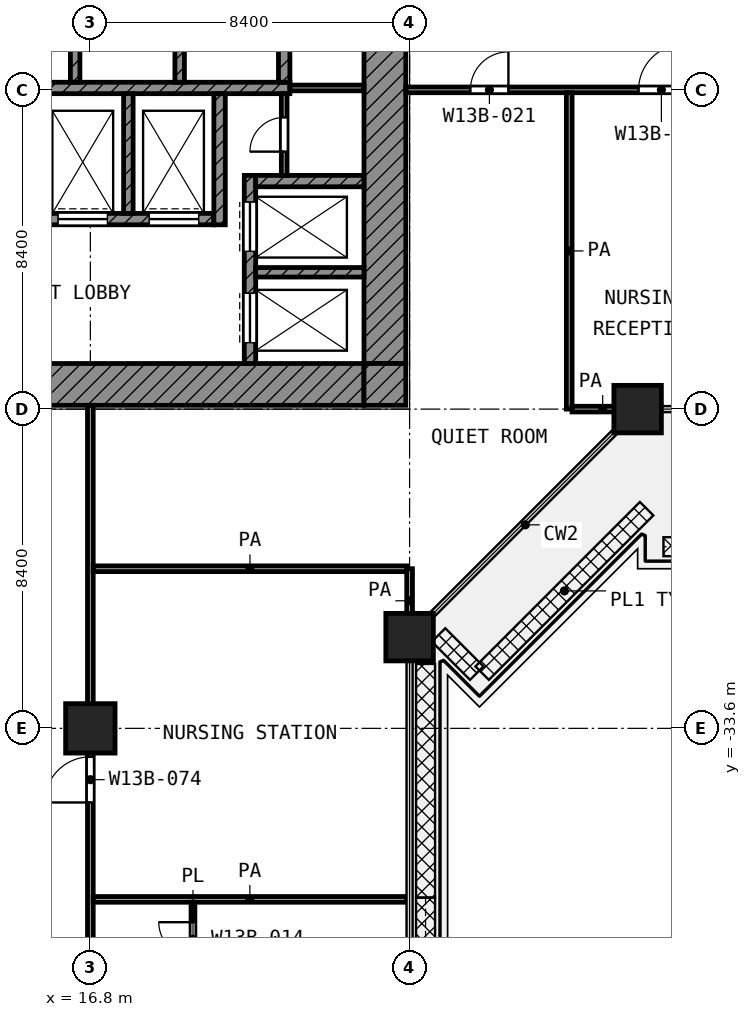
"""IFC4 building model, lengths in metres.
Left out: names, types, materials, properties, quantities, classifications, styles, units other than length and angle.
Written with IfcOpenShell. Run it as: python <this file> out.ifc"""

import sys

from ifc_helpers import new_model, si_unit, direction, frame, frame_2d, origin, origin_2d, place, context, subcontext, project, spatial, rectangle, extrude, element, fill, save


model = new_model("IFC4")
c1 = context("Model", 3, precision=1e-05, world=origin(), true_north=direction((0.0, 1.0)))
c2 = subcontext(c1, "Body", "Model", "MODEL_VIEW")
j1 = project(units=[si_unit("LENGTHUNIT", "METRE"), si_unit("PLANEANGLEUNIT", "RADIAN")], contexts=[c1])
p1 = place(None, origin())
s1 = spatial("IfcSite", under=j1, at=p1, CompositionType="ELEMENT")
p2 = place(p1, origin())
s2 = spatial("IfcBuilding", under=s1, at=p2, CompositionType="ELEMENT")
p3 = place(p2, frame((0.0, 0.0, 89.6)))
s3 = spatial("IfcBuildingStorey", under=s2, at=p3, CompositionType="ELEMENT", Elevation=89.6)
for number, where, z_axis, x_axis in (
    (1, (31.2, -25.2, 0.0), (0.0, 0.0, 1.0), (1.0, 0.0, 0.0)),
    (2, (25.2, -31.2, 0.0), (0.0, 0.0, 1.0), (1.0, 0.0, 0.0)),
):
    element("IfcColumn", number, at=place(p3, frame(where, z_axis=z_axis, x_axis=x_axis)), inside=s3, PredefinedType="COLUMN", context=c2, shape_type="SweptSolid", body=[
        extrude(rectangle(XDim=1.25, YDim=1.25, at=origin_2d()), origin(), (0.0, 0.0, 1.0), 4.2),
    ])
p4 = place(p3, frame((16.8, -33.6, 0.0), z_axis=(0.0, 0.0, 1.0), x_axis=(1.0, 0.0, 0.0)))
e3 = element("IfcColumn", 3, at=p4, inside=s3, PredefinedType="COLUMN", context=c2, shape_type="SweptSolid", body=[
    extrude(rectangle(XDim=1.3, YDim=1.3, at=origin_2d()), origin(), (0.0, 0.0, 1.0), 4.2),
])
p5 = place(p3, frame((24.55, -24.0, 0.0), z_axis=(0.0, 0.0, 1.0), x_axis=(0.0, 1.0, 0.0)))
e4 = element("IfcWall", 4, at=p5, inside=s3, PredefinedType="SHEAR", context=c2, shape_type="SweptSolid", body=[
    extrude(rectangle(XDim=18.6, YDim=1.1, at=frame_2d((9.3, 0.0))), origin(), (0.0, 0.0, 1.0), 3.7),
])
p6 = place(p5, frame((10.5, 0.0, 0.0)))
e5 = element("IfcOpeningElement", 5, at=p6, cuts=e4, PredefinedType="OPENING", context=c2, shape_type="SweptSolid", body=[
    extrude(rectangle(XDim=1.8, YDim=2.1, at=frame_2d((0.9, 1.05))), frame((0.0, 0.56, 0.0), z_axis=(0.0, -1.0, 0.0), x_axis=(1.0, 0.0, 0.0)), (0.0, 0.0, 1.0), 1.12),
])
p7 = place(p3, frame((5.4, -24.55, 0.0), z_axis=(0.0, 0.0, 1.0), x_axis=(1.0, 0.0, 0.0)))
e6 = element("IfcWall", 6, at=p7, inside=s3, PredefinedType="SHEAR", context=c2, shape_type="SweptSolid", body=[
    extrude(rectangle(XDim=18.6, YDim=1.1, at=frame_2d((9.3, 0.0))), origin(), (0.0, 0.0, 1.0), 3.7),
])
p8 = place(p7, frame((6.3, 0.0, 0.0)))
e7 = element("IfcOpeningElement", 7, at=p8, cuts=e6, PredefinedType="OPENING", context=c2, shape_type="SweptSolid", body=[
    extrude(rectangle(XDim=1.8, YDim=2.1, at=frame_2d((0.9, 1.05))), frame((0.0, 0.56, 0.0), z_axis=(0.0, -1.0, 0.0), x_axis=(1.0, 0.0, 0.0)), (0.0, 0.0, 1.0), 1.12),
])
p9 = place(p3, frame((24.55, -25.1, 0.0), z_axis=(0.0, 0.0, 1.0), x_axis=(0.0, 1.0, 0.0)))
e8 = element("IfcWall", 8, at=p9, inside=s3, PredefinedType="SHEAR", context=c2, shape_type="SweptSolid", body=[
    extrude(rectangle(XDim=1.1, YDim=1.1, at=frame_2d((0.55, 0.0))), origin(), (0.0, 0.0, 1.0), 3.7),
])
p10 = place(p3, frame((5.4, -16.75, 0.0), z_axis=(0.0, 0.0, 1.0), x_axis=(1.0, 0.0, 0.0)))
e9 = element("IfcWall", 9, at=p10, inside=s3, PredefinedType="SHEAR", context=c2, shape_type="SweptSolid", body=[
    extrude(rectangle(XDim=16.65, YDim=0.3, at=frame_2d((8.325, 0.0))), origin(), (0.0, 0.0, 1.0), 3.7),
])
p11 = place(p3, frame((5.4, -20.2, 0.0), z_axis=(0.0, 0.0, 1.0), x_axis=(1.0, 0.0, 0.0)))
e10 = element("IfcWall", 10, at=p11, inside=s3, PredefinedType="SHEAR", context=c2, shape_type="SweptSolid", body=[
    extrude(rectangle(XDim=14.65, YDim=0.3, at=frame_2d((7.325, 0.0))), origin(), (0.0, 0.0, 1.0), 3.7),
])
p12 = place(p11, frame((10.55, 0.0, 0.0)))
e11 = element("IfcOpeningElement", 11, at=p12, cuts=e10, PredefinedType="OPENING", context=c2, shape_type="SweptSolid", body=[
    extrude(rectangle(XDim=1.3, YDim=2.1, at=frame_2d((0.65, 1.05))), frame((0.0, 0.16, 0.0), z_axis=(0.0, -1.0, 0.0), x_axis=(1.0, 0.0, 0.0)), (0.0, 0.0, 1.0), 0.32),
])
p13 = place(p11, frame((12.95, 0.0, 0.0)))
e12 = element("IfcOpeningElement", 12, at=p13, cuts=e10, PredefinedType="OPENING", context=c2, shape_type="SweptSolid", body=[
    extrude(rectangle(XDim=1.3, YDim=2.1, at=frame_2d((0.65, 1.05))), frame((0.0, 0.16, 0.0), z_axis=(0.0, -1.0, 0.0), x_axis=(1.0, 0.0, 0.0)), (0.0, 0.0, 1.0), 0.32),
])
p14 = place(p11, frame((0.55, 0.0, 0.0)))
e13 = element("IfcOpeningElement", 13, at=p14, cuts=e10, PredefinedType="OPENING", context=c2, shape_type="SweptSolid", body=[
    extrude(rectangle(XDim=1.3, YDim=2.1, at=frame_2d((0.65, 1.05))), frame((0.0, 0.16, 0.0), z_axis=(0.0, -1.0, 0.0), x_axis=(1.0, 0.0, 0.0)), (0.0, 0.0, 1.0), 0.32),
])
p15 = place(p11, frame((2.95, 0.0, 0.0)))
e14 = element("IfcOpeningElement", 14, at=p15, cuts=e10, PredefinedType="OPENING", context=c2, shape_type="SweptSolid", body=[
    extrude(rectangle(XDim=1.3, YDim=2.1, at=frame_2d((0.65, 1.05))), frame((0.0, 0.16, 0.0), z_axis=(0.0, -1.0, 0.0), x_axis=(1.0, 0.0, 0.0)), (0.0, 0.0, 1.0), 0.32),
])
p16 = place(p11, frame((5.95, 0.0, 0.0)))
e15 = element("IfcOpeningElement", 15, at=p16, cuts=e10, PredefinedType="OPENING", context=c2, shape_type="SweptSolid", body=[
    extrude(rectangle(XDim=0.9, YDim=2.1, at=frame_2d((0.45, 1.05))), frame((0.0, 0.16, 0.0), z_axis=(0.0, -1.0, 0.0), x_axis=(1.0, 0.0, 0.0)), (0.0, 0.0, 1.0), 0.32),
])
p17 = place(p11, frame((8.35, 0.0, 0.0)))
e16 = element("IfcOpeningElement", 16, at=p17, cuts=e10, PredefinedType="OPENING", context=c2, shape_type="SweptSolid", body=[
    extrude(rectangle(XDim=0.9, YDim=2.1, at=frame_2d((0.45, 1.05))), frame((0.0, 0.16, 0.0), z_axis=(0.0, -1.0, 0.0), x_axis=(1.0, 0.0, 0.0)), (0.0, 0.0, 1.0), 0.32),
])
p18 = place(p3, frame((20.2, -20.35, 0.0), z_axis=(0.0, 0.0, 1.0), x_axis=(0.0, 1.0, 0.0)))
e17 = element("IfcWall", 17, at=p18, inside=s3, PredefinedType="SHEAR", context=c2, shape_type="SweptSolid", body=[
    extrude(rectangle(XDim=3.45, YDim=0.3, at=frame_2d((1.725, 0.0))), origin(), (0.0, 0.0, 1.0), 3.7),
])
p19 = place(p3, frame((21.9, -16.6, 0.0), z_axis=(0.0, 0.0, 1.0), x_axis=(0.0, 1.0, 0.0)))
e18 = element("IfcWall", 18, at=p19, inside=s3, PredefinedType="SHEAR", context=c2, shape_type="SweptSolid", body=[
    extrude(rectangle(XDim=2.35, YDim=0.3, at=frame_2d((1.175, 0.0))), origin(), (0.0, 0.0, 1.0), 3.7),
])
p20 = place(p3, frame((21.15, -19.2, 0.0), z_axis=(0.0, 0.0, 1.0), x_axis=(1.0, 0.0, 0.0)))
e19 = element("IfcWall", 19, at=p20, inside=s3, PredefinedType="SHEAR", context=c2, shape_type="SweptSolid", body=[
    extrude(rectangle(XDim=2.85, YDim=0.3, at=frame_2d((1.425, 0.0))), origin(), (0.0, 0.0, 1.0), 3.7),
])
p21 = place(p3, frame((21.0, -24.0, 0.0), z_axis=(0.0, 0.0, 1.0), x_axis=(0.0, 1.0, 0.0)))
e20 = element("IfcWall", 20, at=p21, inside=s3, PredefinedType="SHEAR", context=c2, shape_type="SweptSolid", body=[
    extrude(rectangle(XDim=4.95, YDim=0.3, at=frame_2d((2.475, 0.0))), origin(), (0.0, 0.0, 1.0), 3.7),
])
p22 = place(p21, frame((2.95, 0.0, 0.0)))
e21 = element("IfcOpeningElement", 21, at=p22, cuts=e20, PredefinedType="OPENING", context=c2, shape_type="SweptSolid", body=[
    extrude(rectangle(XDim=1.3, YDim=2.1, at=frame_2d((0.65, 1.05))), frame((0.0, 0.16, 0.0), z_axis=(0.0, -1.0, 0.0), x_axis=(1.0, 0.0, 0.0)), (0.0, 0.0, 1.0), 0.32),
])
p23 = place(p21, frame((0.55, 0.0, 0.0)))
e22 = element("IfcOpeningElement", 22, at=p23, cuts=e20, PredefinedType="OPENING", context=c2, shape_type="SweptSolid", body=[
    extrude(rectangle(XDim=1.3, YDim=2.1, at=frame_2d((0.65, 1.05))), frame((0.0, 0.16, 0.0), z_axis=(0.0, -1.0, 0.0), x_axis=(1.0, 0.0, 0.0)), (0.0, 0.0, 1.0), 0.32),
])
p24 = place(p3, frame((21.15, -21.6, 0.0), z_axis=(0.0, 0.0, 1.0), x_axis=(1.0, 0.0, 0.0)))
e23 = element("IfcWall", 23, at=p24, inside=s3, PredefinedType="SHEAR", context=c2, shape_type="SweptSolid", body=[
    extrude(rectangle(XDim=2.85, YDim=0.25, at=frame_2d((1.425, 0.0))), origin(), (0.0, 0.0, 1.0), 3.7),
])
p25 = place(p3, frame((17.8, -20.05, 0.0), z_axis=(0.0, 0.0, 1.0), x_axis=(0.0, 1.0, 0.0)))
e24 = element("IfcWall", 24, at=p25, inside=s3, PredefinedType="SHEAR", context=c2, shape_type="SweptSolid", body=[
    extrude(rectangle(XDim=3.15, YDim=0.25, at=frame_2d((1.575, 0.0))), origin(), (0.0, 0.0, 1.0), 3.7),
])
for number, where, z_axis, x_axis in (
    (25, (16.4, -16.6, 0.0), (0.0, 0.0, 1.0), (0.0, 1.0, 0.0)),
    (26, (19.15, -16.6, 0.0), (0.0, 0.0, 1.0), (0.0, 1.0, 0.0)),
):
    element("IfcWall", number, at=place(p3, frame(where, z_axis=z_axis, x_axis=x_axis)), inside=s3, PredefinedType="SHEAR", context=c2, shape_type="SweptSolid", body=[
        extrude(rectangle(XDim=2.35, YDim=0.25, at=frame_2d((1.175, 0.0))), origin(), (0.0, 0.0, 1.0), 3.7),
    ])
p26 = place(p3, frame((21.9, -19.05, 0.0), z_axis=(0.0, 0.0, 1.0), x_axis=(0.0, 1.0, 0.0)))
e27 = element("IfcWall", 27, at=p26, inside=s3, PredefinedType="PARTITIONING", context=c2, shape_type="SweptSolid", body=[
    extrude(rectangle(XDim=2.15, YDim=0.15, at=frame_2d((1.075, 0.0))), origin(), (0.0, 0.0, 1.0), 3.7),
])
p27 = place(p26, frame((0.625, 0.0, 0.0)))
e28 = element("IfcOpeningElement", 28, at=p27, cuts=e27, PredefinedType="OPENING", context=c2, shape_type="SweptSolid", body=[
    extrude(rectangle(XDim=0.9, YDim=2.1, at=frame_2d((0.45, 1.05))), frame((0.0, 0.085, 0.0), z_axis=(0.0, -1.0, 0.0), x_axis=(1.0, 0.0, 0.0)), (0.0, 0.0, 1.0), 0.17),
])
p28 = place(p3, frame((22.05, -16.75, 0.0), z_axis=(0.0, 0.0, 1.0), x_axis=(1.0, 0.0, 0.0)))
e29 = element("IfcWall", 29, at=p28, inside=s3, PredefinedType="PARTITIONING", context=c2, shape_type="SweptSolid", body=[
    extrude(rectangle(XDim=1.95, YDim=0.15, at=frame_2d((0.975, 0.0))), origin(), (0.0, 0.0, 1.0), 3.7),
])
p29 = place(p3, frame((19.5, -40.2, 0.0), z_axis=(0.0, 0.0, 1.0), x_axis=(0.0, 1.0, 0.0)))
e30 = element("IfcWall", 30, at=p29, inside=s3, PredefinedType="PARTITIONING", context=c2, shape_type="SweptSolid", body=[
    extrude(rectangle(XDim=2.025, YDim=0.1, at=frame_2d((1.012, 0.0))), origin(), (0.0, 0.0, 1.0), 3.7),
])
p30 = place(p29, frame((0.6, 0.0, 0.0)))
e31 = element("IfcOpeningElement", 31, at=p30, cuts=e30, PredefinedType="OPENING", context=c2, shape_type="SweptSolid", body=[
    extrude(rectangle(XDim=0.9, YDim=2.1, at=frame_2d((0.45, 1.05))), frame((0.0, 0.06, 0.0), z_axis=(0.0, -1.0, 0.0), x_axis=(1.0, 0.0, 0.0)), (0.0, 0.0, 1.0), 0.12),
])
p31 = place(p3, frame((16.875, -38.1, 0.0), z_axis=(0.0, 0.0, 1.0), x_axis=(1.0, 0.0, 0.0)))
e32 = element("IfcWall", 32, at=p31, inside=s3, PredefinedType="PARTITIONING", context=c2, shape_type="SweptSolid", body=[
    extrude(rectangle(XDim=8.245, YDim=0.15, at=frame_2d((4.123, 0.0))), origin(), (0.0, 0.0, 1.0), 3.7),
])
p32 = place(p3, frame((16.875, -29.4, 0.0), z_axis=(0.0, 0.0, 1.0), x_axis=(1.0, 0.0, 0.0)))
e33 = element("IfcWall", 33, at=p32, inside=s3, PredefinedType="PARTITIONING", context=c2, shape_type="SweptSolid", body=[
    extrude(rectangle(XDim=8.25, YDim=0.15, at=frame_2d((4.125, 0.0))), origin(), (0.0, 0.0, 1.0), 3.7),
])
p33 = place(p3, frame((29.475, -25.2, 0.0), z_axis=(0.0, 0.0, 1.0), x_axis=(1.0, 0.0, 0.0)))
e34 = element("IfcWall", 34, at=p33, inside=s3, PredefinedType="PARTITIONING", context=c2, shape_type="SweptSolid", body=[
    extrude(rectangle(XDim=1.612, YDim=0.15, at=frame_2d((0.806, 0.0))), origin(), (0.0, 0.0, 1.0), 3.7),
])
p34 = place(p3, frame((25.1, -16.8, 0.0), z_axis=(0.0, 0.0, 1.0), x_axis=(1.0, 0.0, 0.0)))
e35 = element("IfcWall", 35, at=p34, inside=s3, PredefinedType="PARTITIONING", context=c2, shape_type="SweptSolid", body=[
    extrude(rectangle(XDim=16.823, YDim=0.15, at=frame_2d((8.412, 0.0))), origin(), (0.0, 0.0, 1.0), 3.7),
])
p35 = place(p34, frame((1.7, 0.0, 0.0)))
e36 = element("IfcOpeningElement", 36, at=p35, cuts=e35, PredefinedType="OPENING", context=c2, shape_type="SweptSolid", body=[
    extrude(rectangle(XDim=1.0, YDim=2.1, at=frame_2d((0.5, 1.05))), frame((0.0, 0.085, 0.0), z_axis=(0.0, -1.0, 0.0), x_axis=(1.0, 0.0, 0.0)), (0.0, 0.0, 1.0), 0.17),
])
p36 = place(p34, frame((6.125, 0.0, 0.0)))
e37 = element("IfcOpeningElement", 37, at=p36, cuts=e35, PredefinedType="OPENING", context=c2, shape_type="SweptSolid", body=[
    extrude(rectangle(XDim=1.2, YDim=2.1, at=frame_2d((0.6, 1.05))), frame((0.0, 0.085, 0.0), z_axis=(0.0, -1.0, 0.0), x_axis=(1.0, 0.0, 0.0)), (0.0, 0.0, 1.0), 0.17),
])
p37 = place(p34, frame((13.15, 0.0, 0.0)))
e38 = element("IfcOpeningElement", 38, at=p37, cuts=e35, PredefinedType="OPENING", context=c2, shape_type="SweptSolid", body=[
    extrude(rectangle(XDim=1.2, YDim=2.1, at=frame_2d((0.6, 1.05))), frame((0.0, 0.085, 0.0), z_axis=(0.0, -1.0, 0.0), x_axis=(1.0, 0.0, 0.0)), (0.0, 0.0, 1.0), 0.17),
])
p38 = place(p34, frame((11.6, 0.0, 0.0)))
e39 = element("IfcOpeningElement", 39, at=p38, cuts=e35, PredefinedType="OPENING", context=c2, shape_type="SweptSolid", body=[
    extrude(rectangle(XDim=1.2, YDim=2.1, at=frame_2d((0.6, 1.05))), frame((0.0, 0.085, 0.0), z_axis=(0.0, -1.0, 0.0), x_axis=(1.0, 0.0, 0.0)), (0.0, 0.0, 1.0), 0.17),
])
p39 = place(p34, frame((15.0, 0.0, 0.0)))
e40 = element("IfcOpeningElement", 40, at=p39, cuts=e35, PredefinedType="OPENING", context=c2, shape_type="SweptSolid", body=[
    extrude(rectangle(XDim=1.2, YDim=2.1, at=frame_2d((0.6, 1.05))), frame((0.0, 0.085, 0.0), z_axis=(0.0, -1.0, 0.0), x_axis=(1.0, 0.0, 0.0)), (0.0, 0.0, 1.0), 0.17),
])
p40 = place(p3, frame((16.8, -58.798, 0.0), z_axis=(0.0, 0.0, 1.0), x_axis=(0.0, 1.0, 0.0)))
e41 = element("IfcWall", 41, at=p40, inside=s3, PredefinedType="PARTITIONING", context=c2, shape_type="SweptSolid", body=[
    extrude(rectangle(XDim=33.698, YDim=0.15, at=frame_2d((16.849, 0.0))), origin(), (0.0, 0.0, 1.0), 3.7),
])
p41 = place(p40, frame((23.248, 0.0, 0.0)))
e42 = element("IfcOpeningElement", 42, at=p41, cuts=e41, PredefinedType="OPENING", context=c2, shape_type="SweptSolid", body=[
    extrude(rectangle(XDim=1.2, YDim=2.1, at=frame_2d((0.6, 1.05))), frame((0.0, 0.085, 0.0), z_axis=(0.0, -1.0, 0.0), x_axis=(1.0, 0.0, 0.0)), (0.0, 0.0, 1.0), 0.17),
])
p42 = place(p40, frame((17.498, 0.0, 0.0)))
e43 = element("IfcOpeningElement", 43, at=p42, cuts=e41, PredefinedType="OPENING", context=c2, shape_type="SweptSolid", body=[
    extrude(rectangle(XDim=0.9, YDim=2.1, at=frame_2d((0.45, 1.05))), frame((0.0, 0.085, 0.0), z_axis=(0.0, -1.0, 0.0), x_axis=(1.0, 0.0, 0.0)), (0.0, 0.0, 1.0), 0.17),
])
p43 = place(p40, frame((13.648, 0.0, 0.0)))
e44 = element("IfcOpeningElement", 44, at=p43, cuts=e41, PredefinedType="OPENING", context=c2, shape_type="SweptSolid", body=[
    extrude(rectangle(XDim=1.2, YDim=2.1, at=frame_2d((0.6, 1.05))), frame((0.0, 0.085, 0.0), z_axis=(0.0, -1.0, 0.0), x_axis=(1.0, 0.0, 0.0)), (0.0, 0.0, 1.0), 0.17),
])
p44 = place(p40, frame((9.298, 0.0, 0.0)))
e45 = element("IfcOpeningElement", 45, at=p44, cuts=e41, PredefinedType="OPENING", context=c2, shape_type="SweptSolid", body=[
    extrude(rectangle(XDim=1.2, YDim=2.1, at=frame_2d((0.6, 1.05))), frame((0.0, 0.085, 0.0), z_axis=(0.0, -1.0, 0.0), x_axis=(1.0, 0.0, 0.0)), (0.0, 0.0, 1.0), 0.17),
])
p45 = place(p40, frame((6.498, 0.0, 0.0)))
e46 = element("IfcOpeningElement", 46, at=p45, cuts=e41, PredefinedType="OPENING", context=c2, shape_type="SweptSolid", body=[
    extrude(rectangle(XDim=1.2, YDim=2.1, at=frame_2d((0.6, 1.05))), frame((0.0, 0.085, 0.0), z_axis=(0.0, -1.0, 0.0), x_axis=(1.0, 0.0, 0.0)), (0.0, 0.0, 1.0), 0.17),
])
p46 = place(p40, frame((4.648, 0.0, 0.0)))
e47 = element("IfcOpeningElement", 47, at=p46, cuts=e41, PredefinedType="OPENING", context=c2, shape_type="SweptSolid", body=[
    extrude(rectangle(XDim=1.2, YDim=2.1, at=frame_2d((0.6, 1.05))), frame((0.0, 0.085, 0.0), z_axis=(0.0, -1.0, 0.0), x_axis=(1.0, 0.0, 0.0)), (0.0, 0.0, 1.0), 0.17),
])
p47 = place(p40, frame((0.698, 0.0, 0.0)))
e48 = element("IfcOpeningElement", 48, at=p47, cuts=e41, PredefinedType="OPENING", context=c2, shape_type="SweptSolid", body=[
    extrude(rectangle(XDim=1.2, YDim=2.1, at=frame_2d((0.6, 1.05))), frame((0.0, 0.085, 0.0), z_axis=(0.0, -1.0, 0.0), x_axis=(1.0, 0.0, 0.0)), (0.0, 0.0, 1.0), 0.17),
])
p48 = place(p3, frame((25.2, -31.087, 0.0), z_axis=(0.0, 0.0, 1.0), x_axis=(0.0, 1.0, 0.0)))
e49 = element("IfcWall", 49, at=p48, inside=s3, PredefinedType="PARTITIONING", context=c2, shape_type="SweptSolid", body=[
    extrude(rectangle(XDim=1.687, YDim=0.15, at=frame_2d((0.844, 0.0))), origin(), (0.0, 0.0, 1.0), 3.7),
])
p49 = place(p3, frame((29.4, -25.2, 0.0), z_axis=(0.0, 0.0, 1.0), x_axis=(0.0, 1.0, 0.0)))
e50 = element("IfcWall", 50, at=p49, inside=s3, PredefinedType="PARTITIONING", context=c2, shape_type="SweptSolid", body=[
    extrude(rectangle(XDim=8.325, YDim=0.15, at=frame_2d((4.163, 0.0))), origin(), (0.0, 0.0, 1.0), 3.7),
])
p50 = place(p22, origin())
e51 = element("IfcDoor", 51, at=p50, inside=s3, OperationType="DOUBLE_DOOR_SLIDING", PredefinedType="DOOR", context=c2, shape_type="SweptSolid", body=[
    extrude(rectangle(XDim=1.3, YDim=2.1, at=frame_2d((0.65, 1.05))), frame((0.0, 0.025, 0.0), z_axis=(0.0, -1.0, 0.0), x_axis=(1.0, 0.0, 0.0)), (0.0, 0.0, 1.0), 0.05),
])
fill(e21, e51)
p51 = place(p23, origin())
e52 = element("IfcDoor", 52, at=p51, inside=s3, OperationType="DOUBLE_DOOR_SLIDING", PredefinedType="DOOR", context=c2, shape_type="SweptSolid", body=[
    extrude(rectangle(XDim=1.3, YDim=2.1, at=frame_2d((0.65, 1.05))), frame((0.0, 0.025, 0.0), z_axis=(0.0, -1.0, 0.0), x_axis=(1.0, 0.0, 0.0)), (0.0, 0.0, 1.0), 0.05),
])
fill(e22, e52)
p52 = place(p12, origin())
e53 = element("IfcDoor", 53, at=p52, inside=s3, OperationType="DOUBLE_DOOR_SLIDING", PredefinedType="DOOR", context=c2, shape_type="SweptSolid", body=[
    extrude(rectangle(XDim=1.3, YDim=2.1, at=frame_2d((0.65, 1.05))), frame((0.0, 0.025, 0.0), z_axis=(0.0, -1.0, 0.0), x_axis=(1.0, 0.0, 0.0)), (0.0, 0.0, 1.0), 0.05),
])
fill(e11, e53)
p53 = place(p13, origin())
e54 = element("IfcDoor", 54, at=p53, inside=s3, OperationType="DOUBLE_DOOR_SLIDING", PredefinedType="DOOR", context=c2, shape_type="SweptSolid", body=[
    extrude(rectangle(XDim=1.3, YDim=2.1, at=frame_2d((0.65, 1.05))), frame((0.0, 0.025, 0.0), z_axis=(0.0, -1.0, 0.0), x_axis=(1.0, 0.0, 0.0)), (0.0, 0.0, 1.0), 0.05),
])
fill(e12, e54)
p54 = place(p27, origin())
e55 = element("IfcDoor", 55, at=p54, inside=s3, OperationType="SINGLE_SWING_LEFT", PredefinedType="DOOR", context=c2, shape_type="SweptSolid", body=[
    extrude(rectangle(XDim=0.9, YDim=2.1, at=frame_2d((0.45, 1.05))), frame((0.0, 0.025, 0.0), z_axis=(0.0, -1.0, 0.0), x_axis=(1.0, 0.0, 0.0)), (0.0, 0.0, 1.0), 0.05),
])
fill(e28, e55)
p55 = place(p35, origin())
e56 = element("IfcDoor", 56, at=p55, inside=s3, OperationType="SINGLE_SWING_RIGHT", PredefinedType="DOOR", context=c2, shape_type="SweptSolid", body=[
    extrude(rectangle(XDim=1.0, YDim=2.1, at=frame_2d((0.5, 1.05))), frame((0.0, 0.025, 0.0), z_axis=(0.0, -1.0, 0.0), x_axis=(1.0, 0.0, 0.0)), (0.0, 0.0, 1.0), 0.05),
])
fill(e36, e56)
p56 = place(p36, origin())
e57 = element("IfcDoor", 57, at=p56, inside=s3, OperationType="SINGLE_SWING_RIGHT", PredefinedType="DOOR", context=c2, shape_type="SweptSolid", body=[
    extrude(rectangle(XDim=1.2, YDim=2.1, at=frame_2d((0.6, 1.05))), frame((0.0, 0.025, 0.0), z_axis=(0.0, -1.0, 0.0), x_axis=(1.0, 0.0, 0.0)), (0.0, 0.0, 1.0), 0.05),
])
fill(e37, e57)
p57 = place(p41, origin())
e58 = element("IfcDoor", 58, at=p57, inside=s3, OperationType="SINGLE_SWING_LEFT", PredefinedType="DOOR", context=c2, shape_type="SweptSolid", body=[
    extrude(rectangle(XDim=1.2, YDim=2.1, at=frame_2d((0.6, 1.05))), frame((0.0, 0.025, 0.0), z_axis=(0.0, -1.0, 0.0), x_axis=(1.0, 0.0, 0.0)), (0.0, 0.0, 1.0), 0.05),
])
fill(e42, e58)
p58 = place(p30, origin())
e59 = element("IfcDoor", 59, at=p58, inside=s3, OperationType="SINGLE_SWING_RIGHT", PredefinedType="DOOR", context=c2, shape_type="SweptSolid", body=[
    extrude(rectangle(XDim=0.9, YDim=2.1, at=frame_2d((0.45, 1.05))), frame((0.0, 0.025, 0.0), z_axis=(0.0, -1.0, 0.0), x_axis=(1.0, 0.0, 0.0)), (0.0, 0.0, 1.0), 0.05),
])
fill(e31, e59)
save(model, sys.argv[1])
